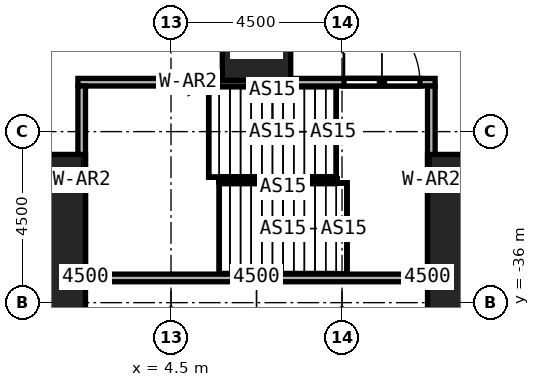
"""IFC4 building model, lengths in metres.
Left out: names, types, materials, properties, quantities, classifications, styles, units other than length and angle.
Written with IfcOpenShell. Run it as: python <this file> out.ifc"""

import sys

from ifc_helpers import new_model, si_unit, direction, frame, frame_2d, origin, origin_2d, place, context, subcontext, project, spatial, rectangle, extrude, element, fill, save


model = new_model("IFC4")
c1 = context("Model", 3, precision=1e-05, world=origin(), true_north=direction((0.0, 1.0)))
c2 = subcontext(c1, "Body", "Model", "MODEL_VIEW")
j1 = project(units=[si_unit("LENGTHUNIT", "METRE"), si_unit("PLANEANGLEUNIT", "RADIAN")], contexts=[c1])
p1 = place(None, origin())
s1 = spatial("IfcSite", under=j1, at=p1, CompositionType="ELEMENT")
p2 = place(p1, origin())
s2 = spatial("IfcBuilding", under=s1, at=p2, CompositionType="ELEMENT")
p3 = place(p2, origin())
s3 = spatial("IfcBuildingStorey", under=s2, at=p3, CompositionType="ELEMENT", Elevation=0.0)
for number, where, z_axis, x_axis in (
    (1, (0.0, -35.55, 0.0), (0.0, 0.0, 1.0), (1.0, 0.0, 0.0)),
    (2, (13.5, -35.55, 0.0), (0.0, 0.0, 1.0), (1.0, 0.0, 0.0)),
):
    element("IfcColumn", number, at=place(p3, frame(where, z_axis=z_axis, x_axis=x_axis)), inside=s3, PredefinedType="COLUMN", context=c2, shape_type="SweptSolid", body=[
        extrude(rectangle(XDim=4.5, YDim=6.9, at=origin_2d()), origin(), (0.0, 0.0, 1.0), 12.0),
    ])
p4 = place(p3, frame((6.75, -29.25, 0.0), z_axis=(0.0, 0.0, 1.0), x_axis=(1.0, 0.0, 0.0)))
e3 = element("IfcColumn", 3, at=p4, inside=s3, PredefinedType="COLUMN", context=c2, shape_type="SweptSolid", body=[
    extrude(rectangle(XDim=1.8, YDim=1.8, at=origin_2d()), origin(), (0.0, 0.0, 1.0), 12.0),
])
p5 = place(p3, frame((2.05, -30.2, 0.0), z_axis=(0.0, 0.0, 1.0), x_axis=(1.0, 0.0, 0.0)))
e4 = element("IfcWall", 4, at=p5, inside=s3, PredefinedType="SOLIDWALL", context=c2, shape_type="SweptSolid", body=[
    extrude(rectangle(XDim=9.4, YDim=0.2, at=frame_2d((4.7, 0.0))), origin(), (0.0, 0.0, 1.0), 12.0),
])
p6 = place(p5, frame((7.0, 0.0, 0.0)))
e5 = element("IfcOpeningElement", 5, at=p6, cuts=e4, PredefinedType="OPENING", context=c2, shape_type="SweptSolid", body=[
    extrude(rectangle(XDim=2.0, YDim=2.4, at=frame_2d((1.0, 1.2))), frame((0.0, 0.1, 0.0), z_axis=(0.0, -1.0, 0.0), x_axis=(1.0, 0.0, 0.0)), (0.0, 0.0, 1.0), 0.2),
])
p7 = place(p3, frame((2.05, -35.35, 0.0), z_axis=(0.0, 0.0, 1.0), x_axis=(1.0, 0.0, 0.0)))
e6 = element("IfcWall", 6, at=p7, inside=s3, PredefinedType="SOLIDWALL", context=c2, shape_type="SweptSolid", body=[
    extrude(rectangle(XDim=9.4, YDim=0.2, at=frame_2d((4.7, 0.0))), origin(), (0.0, 0.0, 1.0), 12.0),
])
for number, where, z_axis, x_axis in (
    (7, (2.15, -35.25, 0.0), (0.0, 0.0, 1.0), (0.0, 1.0, 0.0)),
    (8, (11.35, -35.25, 0.0), (0.0, 0.0, 1.0), (0.0, 1.0, 0.0)),
):
    element("IfcWall", number, at=place(p3, frame(where, z_axis=z_axis, x_axis=x_axis)), inside=s3, PredefinedType="SOLIDWALL", context=c2, shape_type="SweptSolid", body=[
        extrude(rectangle(XDim=4.95, YDim=0.2, at=frame_2d((2.475, 0.0))), origin(), (0.0, 0.0, 1.0), 12.0),
    ])
p8 = place(p6, origin())
e9 = element("IfcDoor", 9, at=p8, inside=s3, OperationType="DOUBLE_DOOR_SINGLE_SWING", PredefinedType="DOOR", context=c2, shape_type="SweptSolid", body=[
    extrude(rectangle(XDim=2.0, YDim=2.4, at=frame_2d((1.0, 1.2))), frame((0.0, 0.025, 0.0), z_axis=(0.0, -1.0, 0.0), x_axis=(1.0, 0.0, 0.0)), (0.0, 0.0, 1.0), 0.05),
])
fill(e5, e9)
save(model, sys.argv[1])
